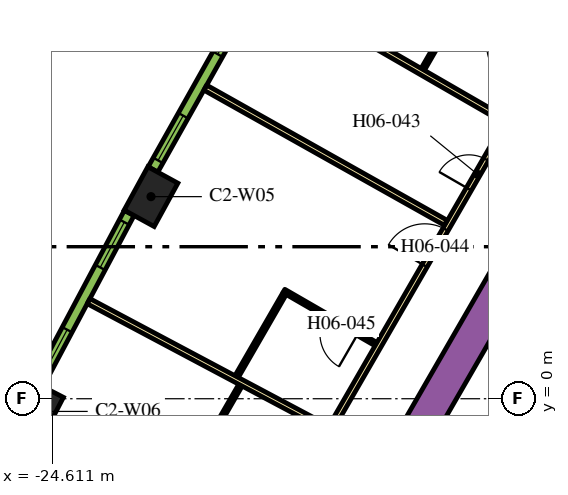
"""IFC4 building model, lengths in metres.
Left out: names, types, materials, properties, quantities, classifications, styles, units other than length and angle.
Written with IfcOpenShell. Run it as: python <this file> out.ifc"""

import sys

from ifc_helpers import new_model, si_unit, direction, frame, frame_2d, origin, origin_2d, place, context, subcontext, project, spatial, rectangle, extrude, element, fill, save


model = new_model("IFC4")
c1 = context("Model", 3, precision=1e-05, world=origin(), true_north=direction((0.0, 1.0)))
c2 = subcontext(c1, "Body", "Model", "MODEL_VIEW")
j1 = project(units=[si_unit("LENGTHUNIT", "METRE"), si_unit("PLANEANGLEUNIT", "RADIAN")], contexts=[c1])
p1 = place(None, origin())
s1 = spatial("IfcSite", under=j1, at=p1, CompositionType="ELEMENT")
p2 = place(p1, origin())
s2 = spatial("IfcBuilding", under=s1, at=p2, CompositionType="ELEMENT")
p3 = place(p2, frame((0.0, 0.0, 83.7)))
s3 = spatial("IfcBuildingStorey", under=s2, at=p3, CompositionType="ELEMENT", Elevation=83.7)
for number, where, z_axis, x_axis in (
    (1, (-22.009, 5.317, 0.0), (0.0, 0.0, 1.0), (-0.48, -0.877, 0.0)),
    (2, (-25.012, -0.334, 0.0), (0.0, 0.0, 1.0), (-0.459, -0.888, 0.0)),
):
    element("IfcColumn", number, at=place(p3, frame(where, z_axis=z_axis, x_axis=x_axis)), inside=s3, PredefinedType="COLUMN", context=c2, shape_type="SweptSolid", body=[
        extrude(rectangle(XDim=1.3, YDim=0.9, at=origin_2d()), origin(), (0.0, 0.0, 1.0), 3.9),
    ])
p4 = place(p3, frame((-15.36, -1.503, 0.0), z_axis=(0.0, 0.0, 1.0), x_axis=(0.50000389221, 0.866023156604, 0.0)))
e3 = element("IfcWall", 3, at=p4, inside=s3, PredefinedType="SOLIDWALL", context=c2, shape_type="SweptSolid", body=[
    extrude(rectangle(XDim=21.0, YDim=0.9, at=frame_2d((10.5, 0.0))), origin(), (0.0, 0.0, 1.0), 3.9),
])
p5 = place(p3, frame((-19.081, -3.9, 0.0), z_axis=(0.0, 0.0, 1.0), x_axis=(0.499998313975, 0.866026377209, 0.0)))
e4 = element("IfcWall", 4, at=p5, inside=s3, PredefinedType="PARTITIONING", context=c2, shape_type="SweptSolid", body=[
    extrude(rectangle(XDim=25.766, YDim=0.15, at=frame_2d((12.883, 0.0))), origin(), (0.0, 0.0, 1.0), 2.75),
])
p6 = place(p5, frame((19.306, 0.0, 0.0)))
e5 = element("IfcOpeningElement", 5, at=p6, cuts=e4, PredefinedType="OPENING", context=c2, shape_type="SweptSolid", body=[
    extrude(rectangle(XDim=1.0, YDim=2.1, at=frame_2d((0.5, 1.05))), frame((0.0, 0.085, 0.0), z_axis=(0.0, -1.0, 0.0), x_axis=(1.0, 0.0, 0.0)), (0.0, 0.0, 1.0), 0.17),
])
p7 = place(p5, frame((18.0, 0.0, 0.0)))
e6 = element("IfcOpeningElement", 6, at=p7, cuts=e4, PredefinedType="OPENING", context=c2, shape_type="SweptSolid", body=[
    extrude(rectangle(XDim=1.0, YDim=2.1, at=frame_2d((0.5, 1.05))), frame((0.0, 0.085, 0.0), z_axis=(0.0, -1.0, 0.0), x_axis=(1.0, 0.0, 0.0)), (0.0, 0.0, 1.0), 0.17),
])
p8 = place(p5, frame((10.874, 0.0, 0.0)))
e7 = element("IfcOpeningElement", 7, at=p8, cuts=e4, PredefinedType="OPENING", context=c2, shape_type="SweptSolid", body=[
    extrude(rectangle(XDim=0.9, YDim=2.1, at=frame_2d((0.45, 1.05))), frame((0.0, 0.085, 0.0), z_axis=(0.0, -1.0, 0.0), x_axis=(1.0, 0.0, 0.0)), (0.0, 0.0, 1.0), 0.17),
])
p9 = place(p5, frame((8.548, 0.0, 0.0)))
e8 = element("IfcOpeningElement", 8, at=p9, cuts=e4, PredefinedType="OPENING", context=c2, shape_type="SweptSolid", body=[
    extrude(rectangle(XDim=1.1, YDim=2.1, at=frame_2d((0.55, 1.05))), frame((0.0, 0.085, 0.0), z_axis=(0.0, -1.0, 0.0), x_axis=(1.0, 0.0, 0.0)), (0.0, 0.0, 1.0), 0.17),
])
p10 = place(p5, frame((0.18, 0.0, 0.0)))
e9 = element("IfcOpeningElement", 9, at=p10, cuts=e4, PredefinedType="OPENING", context=c2, shape_type="SweptSolid", body=[
    extrude(rectangle(XDim=1.0, YDim=2.1, at=frame_2d((0.5, 1.05))), frame((0.0, 0.085, 0.0), z_axis=(0.0, -1.0, 0.0), x_axis=(1.0, 0.0, 0.0)), (0.0, 0.0, 1.0), 0.17),
])
p11 = place(p3, frame((-23.652, 2.567, 0.0), z_axis=(0.0, 0.0, 1.0), x_axis=(0.883019237957, -0.469336793144, 0.0)))
e10 = element("IfcWall", 10, at=p11, inside=s3, PredefinedType="PARTITIONING", context=c2, shape_type="SweptSolid", body=[
    extrude(rectangle(XDim=7.111, YDim=0.15, at=frame_2d((3.555, 0.0))), origin(), (0.0, 0.0, 1.0), 2.75),
])
p12 = place(p3, frame((-20.581, 8.185, 0.0), z_axis=(0.0, 0.0, 1.0), x_axis=(0.871820720803, -0.489825102233, 0.0)))
e11 = element("IfcWall", 11, at=p12, inside=s3, PredefinedType="PARTITIONING", context=c2, shape_type="SweptSolid", body=[
    extrude(rectangle(XDim=7.257, YDim=0.15, at=frame_2d((3.628, 0.0))), origin(), (0.0, 0.0, 1.0), 2.75),
])
p13 = place(p3, frame((-18.484, 10.672, 0.0), z_axis=(0.0, 0.0, 1.0), x_axis=(0.866019162053, -0.50001081084, 0.0)))
e12 = element("IfcWall", 12, at=p13, inside=s3, PredefinedType="PARTITIONING", context=c2, shape_type="SweptSolid", body=[
    extrude(rectangle(XDim=6.694, YDim=0.15, at=frame_2d((3.347, 0.0))), origin(), (0.0, 0.0, 1.0), 2.75),
])
p14 = place(p3, frame((-11.75, 8.949, 0.0), z_axis=(0.0, 0.0, 1.0), x_axis=(-0.865997922154, 0.500047596559, 0.0)))
e13 = element("IfcWall", 13, at=p14, inside=s3, PredefinedType="PARTITIONING", context=c2, shape_type="SweptSolid", body=[
    extrude(rectangle(XDim=2.6, YDim=0.1, at=frame_2d((1.3, 0.0))), origin(), (0.0, 0.0, 1.0), 2.75),
])
p15 = place(p14, frame((0.6, 0.0, 0.0)))
e14 = element("IfcOpeningElement", 14, at=p15, cuts=e13, PredefinedType="OPENING", context=c2, shape_type="SweptSolid", body=[
    extrude(rectangle(XDim=0.9, YDim=2.1, at=frame_2d((0.45, 1.05))), frame((0.0, 0.06, 0.0), z_axis=(0.0, -1.0, 0.0), x_axis=(1.0, 0.0, 0.0)), (0.0, 0.0, 1.0), 0.12),
])
p16 = place(p3, frame((-13.983, 10.181, 0.0), z_axis=(0.0, 0.0, 1.0), x_axis=(-0.499980071345, -0.866036909293, 0.0)))
e15 = element("IfcWall", 15, at=p16, inside=s3, PredefinedType="PARTITIONING", context=c2, shape_type="SweptSolid", body=[
    extrude(rectangle(XDim=1.75, YDim=0.1, at=frame_2d((0.875, 0.0))), origin(), (0.0, 0.0, 1.0), 2.75),
])
p17 = place(p3, frame((-16.087, 1.436, 0.0), z_axis=(0.0, 0.0, 1.0), x_axis=(-0.866034573852, 0.49998411664, 0.0)))
e16 = element("IfcWall", 16, at=p17, inside=s3, PredefinedType="PARTITIONING", context=c2, shape_type="SweptSolid", body=[
    extrude(rectangle(XDim=2.8, YDim=0.1, at=frame_2d((1.4, 0.0))), origin(), (0.0, 0.0, 1.0), 2.75),
])
p18 = place(p17, frame((0.55, 0.0, 0.0)))
e17 = element("IfcOpeningElement", 17, at=p18, cuts=e16, PredefinedType="OPENING", context=c2, shape_type="SweptSolid", body=[
    extrude(rectangle(XDim=1.0, YDim=2.1, at=frame_2d((0.5, 1.05))), frame((0.0, 0.06, 0.0), z_axis=(0.0, -1.0, 0.0), x_axis=(1.0, 0.0, 0.0)), (0.0, 0.0, 1.0), 0.12),
])
p19 = place(p3, frame((-18.494, 2.768, 0.0), z_axis=(0.0, 0.0, 1.0), x_axis=(-0.500004791531, -0.866022637375, 0.0)))
e18 = element("IfcWall", 18, at=p19, inside=s3, PredefinedType="PARTITIONING", context=c2, shape_type="SweptSolid", body=[
    extrude(rectangle(XDim=2.52, YDim=0.1, at=frame_2d((1.26, 0.0))), origin(), (0.0, 0.0, 1.0), 2.75),
])
p20 = place(p3, frame((-20.449, -1.019, 0.0), z_axis=(0.0, 0.0, 1.0), x_axis=(0.500061319399, 0.865989998118, 0.0)))
e19 = element("IfcWall", 19, at=p20, inside=s3, PredefinedType="PARTITIONING", context=c2, shape_type="SweptSolid", body=[
    extrude(rectangle(XDim=1.58, YDim=0.1, at=frame_2d((0.79, 0.0))), origin(), (0.0, 0.0, 1.0), 2.75),
])
p21 = place(p3, frame((-19.458, 10.48, 0.0), z_axis=(0.0, 0.0, 1.0), x_axis=(-0.48983164787, -0.87181704316, 0.0)))
e20 = element("IfcWall", 20, at=p21, inside=s3, PredefinedType="SOLIDWALL", context=c2, shape_type="SweptSolid", body=[
    extrude(rectangle(XDim=5.1, YDim=0.29, at=frame_2d((2.55, 0.0))), origin(), (0.0, 0.0, 1.0), 3.65),
])
p22 = place(p21, frame((0.272, 0.0, 0.9)))
e21 = element("IfcOpeningElement", 21, at=p22, cuts=e20, PredefinedType="OPENING", context=c2, shape_type="SweptSolid", body=[
    extrude(rectangle(XDim=1.35, YDim=2.15, at=frame_2d((0.675, 1.075))), frame((0.0, 0.155, 0.0), z_axis=(0.0, -1.0, 0.0), x_axis=(1.0, 0.0, 0.0)), (0.0, 0.0, 1.0), 0.31),
])
p23 = place(p21, frame((3.478, 0.0, 0.9)))
e22 = element("IfcOpeningElement", 22, at=p23, cuts=e20, PredefinedType="OPENING", context=c2, shape_type="SweptSolid", body=[
    extrude(rectangle(XDim=1.35, YDim=2.15, at=frame_2d((0.675, 1.075))), frame((0.0, 0.155, 0.0), z_axis=(0.0, -1.0, 0.0), x_axis=(1.0, 0.0, 0.0)), (0.0, 0.0, 1.0), 0.31),
])
p24 = place(p3, frame((-22.583, 4.887, 0.0), z_axis=(0.0, 0.0, 1.0), x_axis=(-0.469323203119, -0.883026461106, 0.0)))
e23 = element("IfcWall", 23, at=p24, inside=s3, PredefinedType="SOLIDWALL", context=c2, shape_type="SweptSolid", body=[
    extrude(rectangle(XDim=5.101, YDim=0.29, at=frame_2d((2.55, 0.0))), origin(), (0.0, 0.0, 1.0), 3.65),
])
p25 = place(p24, frame((0.273, 0.0, 0.9)))
e24 = element("IfcOpeningElement", 24, at=p25, cuts=e23, PredefinedType="OPENING", context=c2, shape_type="SweptSolid", body=[
    extrude(rectangle(XDim=1.35, YDim=2.15, at=frame_2d((0.675, 1.075))), frame((0.0, 0.155, 0.0), z_axis=(0.0, -1.0, 0.0), x_axis=(1.0, 0.0, 0.0)), (0.0, 0.0, 1.0), 0.31),
])
p26 = place(p24, frame((3.478, 0.0, 0.9)))
e25 = element("IfcOpeningElement", 25, at=p26, cuts=e23, PredefinedType="OPENING", context=c2, shape_type="SweptSolid", body=[
    extrude(rectangle(XDim=1.35, YDim=2.15, at=frame_2d((0.675, 1.075))), frame((0.0, 0.155, 0.0), z_axis=(0.0, -1.0, 0.0), x_axis=(1.0, 0.0, 0.0)), (0.0, 0.0, 1.0), 0.31),
])
p27 = place(p8, origin())
e26 = element("IfcDoor", 26, at=p27, inside=s3, OperationType="SINGLE_SWING_LEFT", PredefinedType="DOOR", context=c2, shape_type="SweptSolid", body=[
    extrude(rectangle(XDim=0.9, YDim=2.1, at=frame_2d((0.45, 1.05))), frame((0.0, 0.025, 0.0), z_axis=(0.0, -1.0, 0.0), x_axis=(1.0, 0.0, 0.0)), (0.0, 0.0, 1.0), 0.05),
])
fill(e7, e26)
p28 = place(p9, origin())
e27 = element("IfcDoor", 27, at=p28, inside=s3, OperationType="SINGLE_SWING_RIGHT", PredefinedType="DOOR", context=c2, shape_type="SweptSolid", body=[
    extrude(rectangle(XDim=1.1, YDim=2.1, at=frame_2d((0.55, 1.05))), frame((0.0, 0.025, 0.0), z_axis=(0.0, -1.0, 0.0), x_axis=(1.0, 0.0, 0.0)), (0.0, 0.0, 1.0), 0.05),
])
fill(e8, e27)
p29 = place(p18, origin())
e28 = element("IfcDoor", 28, at=p29, inside=s3, OperationType="SINGLE_SWING_RIGHT", PredefinedType="DOOR", context=c2, shape_type="SweptSolid", body=[
    extrude(rectangle(XDim=1.0, YDim=2.1, at=frame_2d((0.5, 1.05))), frame((0.0, 0.025, 0.0), z_axis=(0.0, -1.0, 0.0), x_axis=(1.0, 0.0, 0.0)), (0.0, 0.0, 1.0), 0.05),
])
fill(e17, e28)
p30 = place(p22, origin())
e29 = element("IfcWindow", 29, at=p30, inside=s3, PartitioningType="DOUBLE_PANEL_VERTICAL", PredefinedType="WINDOW", context=c2, shape_type="SweptSolid", body=[
    extrude(rectangle(XDim=1.35, YDim=2.15, at=frame_2d((0.675, 1.075))), frame((0.0, 0.015, 0.0), z_axis=(0.0, -1.0, 0.0), x_axis=(1.0, 0.0, 0.0)), (0.0, 0.0, 1.0), 0.06),
])
fill(e21, e29)
p31 = place(p23, origin())
e30 = element("IfcWindow", 30, at=p31, inside=s3, PartitioningType="DOUBLE_PANEL_VERTICAL", PredefinedType="WINDOW", context=c2, shape_type="SweptSolid", body=[
    extrude(rectangle(XDim=1.35, YDim=2.15, at=frame_2d((0.675, 1.075))), frame((0.0, 0.015, 0.0), z_axis=(0.0, -1.0, 0.0), x_axis=(1.0, 0.0, 0.0)), (0.0, 0.0, 1.0), 0.06),
])
fill(e22, e30)
p32 = place(p25, origin())
e31 = element("IfcWindow", 31, at=p32, inside=s3, PartitioningType="DOUBLE_PANEL_VERTICAL", PredefinedType="WINDOW", context=c2, shape_type="SweptSolid", body=[
    extrude(rectangle(XDim=1.35, YDim=2.15, at=frame_2d((0.675, 1.075))), frame((0.0, 0.015, 0.0), z_axis=(0.0, -1.0, 0.0), x_axis=(1.0, 0.0, 0.0)), (0.0, 0.0, 1.0), 0.06),
])
fill(e24, e31)
p33 = place(p26, origin())
e32 = element("IfcWindow", 32, at=p33, inside=s3, PartitioningType="DOUBLE_PANEL_VERTICAL", PredefinedType="WINDOW", context=c2, shape_type="SweptSolid", body=[
    extrude(rectangle(XDim=1.35, YDim=2.15, at=frame_2d((0.675, 1.075))), frame((0.0, 0.015, 0.0), z_axis=(0.0, -1.0, 0.0), x_axis=(1.0, 0.0, 0.0)), (0.0, 0.0, 1.0), 0.06),
])
fill(e25, e32)
save(model, sys.argv[1])
